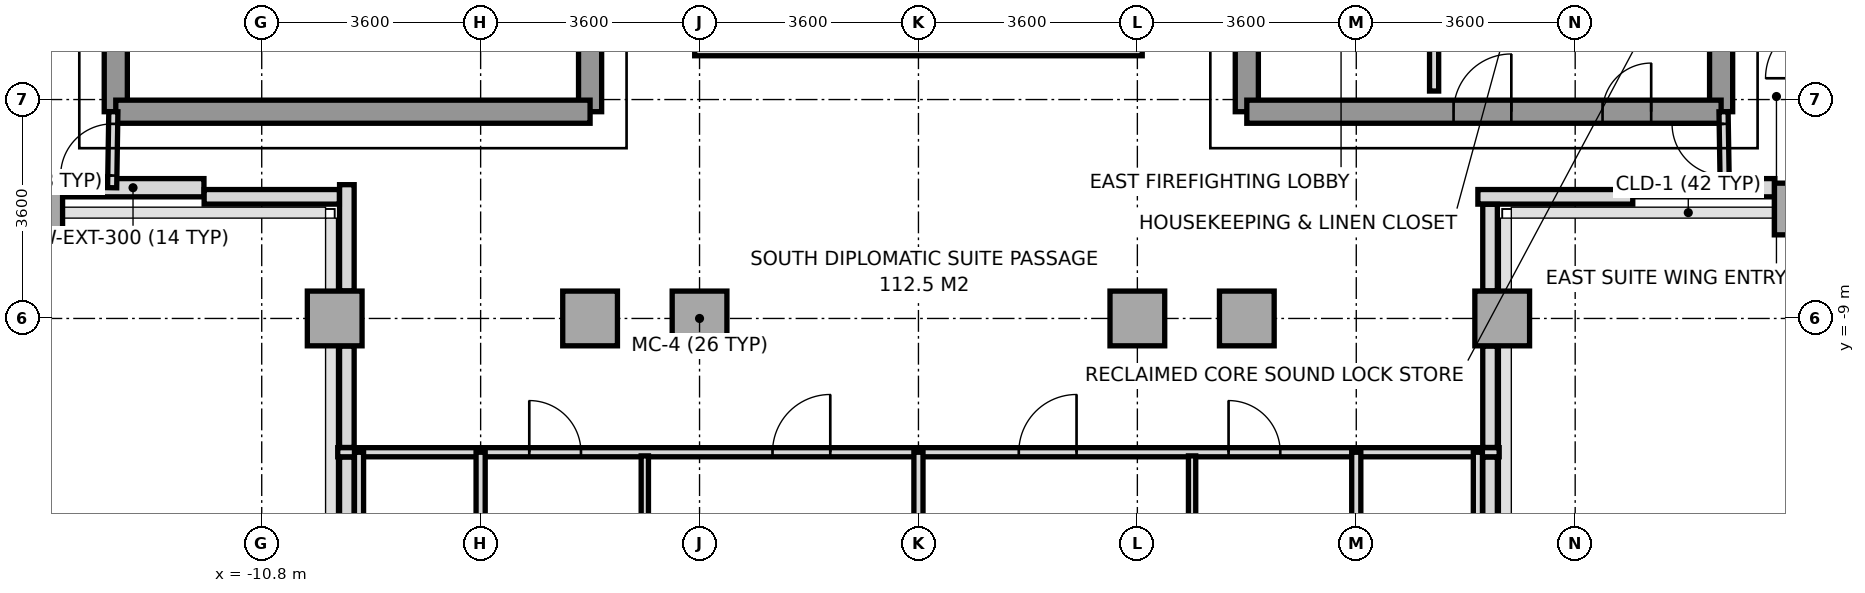
"""IFC4 building model, lengths in metres.
Left out: names, types, materials, properties, quantities, classifications, styles, units other than length and angle.
Written with IfcOpenShell. Run it as: python <this file> out.ifc"""

import sys

from ifc_helpers import new_model, si_unit, direction, frame, frame_2d, origin, origin_2d, place, context, subcontext, project, spatial, rectangle, extrude, source, transform, mapped, element, fill, save


model = new_model("IFC4")
c1 = context("Model", 3, precision=1e-05, world=origin(), true_north=direction((0.0, 1.0)))
c2 = subcontext(c1, "Body", "Model", "MODEL_VIEW")
j1 = project(units=[si_unit("LENGTHUNIT", "METRE"), si_unit("PLANEANGLEUNIT", "RADIAN")], contexts=[c1])
p1 = place(None, origin())
s1 = spatial("IfcSite", under=j1, at=p1, CompositionType="ELEMENT")
p2 = place(p1, origin())
s2 = spatial("IfcBuilding", under=s1, at=p2, CompositionType="ELEMENT")
p3 = place(p2, frame((0.0, 0.0, 201.2)))
s3 = spatial("IfcBuildingStorey", under=s2, at=p3, CompositionType="ELEMENT", Elevation=201.2)
m1 = source(origin(), c2, "Body", "SweptSolid", [
    extrude(rectangle(XDim=0.65, YDim=0.85, at=origin_2d()), origin(), (0.0, 0.0, 1.0), 3.2),
])
p4 = place(p3, frame((-14.4, -7.2, 0.0), z_axis=(0.0, 0.0, 1.0), x_axis=(1.0, 0.0, 0.0)))
e1 = element("IfcColumn", 1, at=p4, inside=s3, PredefinedType="COLUMN", context=c2, shape_type="MappedRepresentation", body=[
    mapped(m1, transform((0.0, 0.0, 0.0), x_axis=(1.0, 0.0, 0.0), y_axis=(0.0, 1.0, 0.0), z_axis=(0.0, 0.0, 1.0), scale=1.0)),
])
m2 = source(origin(), c2, "Body", "SweptSolid", [
    extrude(rectangle(XDim=0.9, YDim=0.9, at=origin_2d()), origin(), (0.0, 0.0, 1.0), 3.2),
])
for number, where, z_axis, x_axis in (
    (2, (-9.6, -9.0, 0.0), (0.0, 0.0, 1.0), (1.0, 0.0, 0.0)),
    (3, (-5.4, -9.0, 0.0), (0.0, 0.0, 1.0), (1.0, 0.0, 0.0)),
    (4, (-3.6, -9.0, 0.0), (0.0, 0.0, 1.0), (1.0, 0.0, 0.0)),
    (5, (3.6, -9.0, 0.0), (0.0, 0.0, 1.0), (1.0, 0.0, 0.0)),
    (6, (5.4, -9.0, 0.0), (0.0, 0.0, 1.0), (1.0, 0.0, 0.0)),
    (7, (9.6, -9.0, 0.0), (0.0, 0.0, 1.0), (1.0, 0.0, 0.0)),
):
    element("IfcColumn", number, at=place(p3, frame(where, z_axis=z_axis, x_axis=x_axis)), inside=s3, PredefinedType="COLUMN", context=c2, shape_type="MappedRepresentation", body=[
        mapped(m2, transform((0.0, 0.0, 0.0), x_axis=(1.0, 0.0, 0.0), y_axis=(0.0, 1.0, 0.0), z_axis=(0.0, 0.0, 1.0), scale=1.0)),
    ])
p5 = place(p3, frame((14.4, -7.2, 0.0), z_axis=(0.0, 0.0, 1.0), x_axis=(1.0, 0.0, 0.0)))
e8 = element("IfcColumn", 8, at=p5, inside=s3, PredefinedType="COLUMN", context=c2, shape_type="MappedRepresentation", body=[
    mapped(m1, transform((0.0, 0.0, 0.0), x_axis=(1.0, 0.0, 0.0), y_axis=(0.0, 1.0, 0.0), z_axis=(0.0, 0.0, 1.0), scale=1.0)),
])
for number, where, z_axis, x_axis in (
    (9, (-14.083, -6.85, 0.0), (0.0, 0.0, 1.0), (1.0, 0.0, 0.0)),
    (10, (11.75, -6.85, 0.0), (0.0, 0.0, 1.0), (1.0, 0.0, 0.0)),
):
    element("IfcWall", number, at=place(p3, frame(where, z_axis=z_axis, x_axis=x_axis)), inside=s3, PredefinedType="SOLIDWALL", context=c2, shape_type="SweptSolid", body=[
        extrude(rectangle(XDim=2.333, YDim=0.3, at=frame_2d((1.167, 0.0))), origin(), (0.0, 0.0, 1.0), 3.2),
    ])
p6 = place(p3, frame((11.747, -7.0, 0.0), z_axis=(0.0, 0.0, 1.0), x_axis=(-1.0, 0.0, 0.0)))
e11 = element("IfcWall", 11, at=p6, inside=s3, PredefinedType="PARAPET", context=c2, shape_type="SweptSolid", body=[
    extrude(rectangle(XDim=2.547, YDim=0.24, at=frame_2d((1.273, 0.0))), origin(), (0.0, 0.0, 1.0), 1.15),
])
p7 = place(p3, frame((9.4, -7.123, 0.0), z_axis=(0.0, 0.0, 1.0), x_axis=(0.0, -1.0, 0.0)))
e12 = element("IfcWall", 12, at=p7, inside=s3, PredefinedType="PARAPET", context=c2, shape_type="SweptSolid", body=[
    extrude(rectangle(XDim=1.424, YDim=0.24, at=frame_2d((0.712, 0.0))), origin(), (0.0, 0.0, 1.0), 1.15),
])
p8 = place(p3, frame((9.4, -9.453, 0.0), z_axis=(0.0, 0.0, 1.0), x_axis=(0.0, -1.0, 0.0)))
e13 = element("IfcWall", 13, at=p8, inside=s3, PredefinedType="PARAPET", context=c2, shape_type="SweptSolid", body=[
    extrude(rectangle(XDim=1.669, YDim=0.24, at=frame_2d((0.834, 0.0))), origin(), (0.0, 0.0, 1.0), 1.15),
])
p9 = place(p3, frame((9.4, -11.278, 0.0), z_axis=(0.0, 0.0, 1.0), x_axis=(0.0, -1.0, 0.0)))
e14 = element("IfcWall", 14, at=p9, inside=s3, PredefinedType="PARAPET", context=c2, shape_type="SweptSolid", body=[
    extrude(rectangle(XDim=4.325, YDim=0.24, at=frame_2d((2.162, 0.0))), origin(), (0.0, 0.0, 1.0), 1.15),
])
p10 = place(p3, frame((-9.4, -15.358, 0.0), z_axis=(0.0, 0.0, 1.0), x_axis=(0.0, 1.0, 0.0)))
e15 = element("IfcWall", 15, at=p10, inside=s3, PredefinedType="PARAPET", context=c2, shape_type="SweptSolid", body=[
    extrude(rectangle(XDim=4.08, YDim=0.24, at=frame_2d((2.04, 0.0))), origin(), (0.0, 0.0, 1.0), 1.15),
])
p11 = place(p3, frame((-9.4, -11.122, 0.0), z_axis=(0.0, 0.0, 1.0), x_axis=(0.0, 1.0, 0.0)))
e16 = element("IfcWall", 16, at=p11, inside=s3, PredefinedType="PARAPET", context=c2, shape_type="SweptSolid", body=[
    extrude(rectangle(XDim=1.669, YDim=0.24, at=frame_2d((0.834, 0.0))), origin(), (0.0, 0.0, 1.0), 1.15),
])
p12 = place(p3, frame((-9.4, -8.547, 0.0), z_axis=(0.0, 0.0, 1.0), x_axis=(0.0, 1.0, 0.0)))
e17 = element("IfcWall", 17, at=p12, inside=s3, PredefinedType="PARAPET", context=c2, shape_type="SweptSolid", body=[
    extrude(rectangle(XDim=1.747, YDim=0.24, at=frame_2d((0.874, 0.0))), origin(), (0.0, 0.0, 1.0), 1.15),
])
p13 = place(p3, frame((-9.523, -7.0, 0.0), z_axis=(0.0, 0.0, 1.0), x_axis=(-1.0, 0.0, 0.0)))
e18 = element("IfcWall", 18, at=p13, inside=s3, PredefinedType="PARAPET", context=c2, shape_type="SweptSolid", body=[
    extrude(rectangle(XDim=2.224, YDim=0.24, at=frame_2d((1.112, 0.0))), origin(), (0.0, 0.0, 1.0), 1.15),
])
p14 = place(p3, frame((-13.2, -5.6, 0.0), z_axis=(0.0, 0.0, 1.0), x_axis=(0.0, 1.0, 0.0)))
e19 = element("IfcWall", 19, at=p14, inside=s3, PredefinedType="SHEAR", context=c2, shape_type="SweptSolid", body=[
    extrude(rectangle(XDim=11.2, YDim=0.38, at=frame_2d((5.6, 0.0))), origin(), (0.0, 0.0, 1.0), 3.2),
])
p15 = place(p3, frame((-5.4, -5.6, 0.0), z_axis=(0.0, 0.0, 1.0), x_axis=(0.0, 1.0, 0.0)))
e20 = element("IfcWall", 20, at=p15, inside=s3, PredefinedType="SHEAR", context=c2, shape_type="SweptSolid", body=[
    extrude(rectangle(XDim=12.5, YDim=0.38, at=frame_2d((6.25, 0.0))), origin(), (0.0, 0.0, 1.0), 3.2),
])
p16 = place(p15, frame((4.55, 0.0, 0.0)))
e21 = element("IfcOpeningElement", 21, at=p16, cuts=e20, PredefinedType="OPENING", context=c2, shape_type="SweptSolid", body=[
    extrude(rectangle(XDim=1.2, YDim=2.2, at=frame_2d((0.6, 1.1))), frame((0.0, 0.2, 0.0), z_axis=(0.0, -1.0, 0.0), x_axis=(1.0, 0.0, 0.0)), (0.0, 0.0, 1.0), 0.4),
])
p17 = place(p15, frame((10.45, 0.0, 0.0)))
e22 = element("IfcOpeningElement", 22, at=p17, cuts=e20, PredefinedType="OPENING", context=c2, shape_type="SweptSolid", body=[
    extrude(rectangle(XDim=1.2, YDim=2.2, at=frame_2d((0.6, 1.1))), frame((0.0, 0.2, 0.0), z_axis=(0.0, -1.0, 0.0), x_axis=(1.0, 0.0, 0.0)), (0.0, 0.0, 1.0), 0.4),
])
p18 = place(p3, frame((-13.2, -5.6, 0.0), z_axis=(0.0, 0.0, 1.0), x_axis=(1.0, 0.0, 0.0)))
e23 = element("IfcWall", 23, at=p18, inside=s3, PredefinedType="SHEAR", context=c2, shape_type="SweptSolid", body=[
    extrude(rectangle(XDim=7.8, YDim=0.38, at=frame_2d((3.9, 0.0))), origin(), (0.0, 0.0, 1.0), 3.2),
])
p19 = place(p3, frame((13.2, -5.6, 0.0), z_axis=(0.0, 0.0, 1.0), x_axis=(0.0, 1.0, 0.0)))
e24 = element("IfcWall", 24, at=p19, inside=s3, PredefinedType="SHEAR", context=c2, shape_type="SweptSolid", body=[
    extrude(rectangle(XDim=11.2, YDim=0.38, at=frame_2d((5.6, 0.0))), origin(), (0.0, 0.0, 1.0), 3.2),
])
p20 = place(p3, frame((5.4, -5.6, 0.0), z_axis=(0.0, 0.0, 1.0), x_axis=(0.0, 1.0, 0.0)))
e25 = element("IfcWall", 25, at=p20, inside=s3, PredefinedType="SHEAR", context=c2, shape_type="SweptSolid", body=[
    extrude(rectangle(XDim=12.5, YDim=0.38, at=frame_2d((6.25, 0.0))), origin(), (0.0, 0.0, 1.0), 3.2),
])
p21 = place(p20, frame((4.55, 0.0, 0.0)))
e26 = element("IfcOpeningElement", 26, at=p21, cuts=e25, PredefinedType="OPENING", context=c2, shape_type="SweptSolid", body=[
    extrude(rectangle(XDim=1.2, YDim=2.2, at=frame_2d((0.6, 1.1))), frame((0.0, 0.2, 0.0), z_axis=(0.0, -1.0, 0.0), x_axis=(1.0, 0.0, 0.0)), (0.0, 0.0, 1.0), 0.4),
])
p22 = place(p20, frame((10.45, 0.0, 0.0)))
e27 = element("IfcOpeningElement", 27, at=p22, cuts=e25, PredefinedType="OPENING", context=c2, shape_type="SweptSolid", body=[
    extrude(rectangle(XDim=1.2, YDim=2.2, at=frame_2d((0.6, 1.1))), frame((0.0, 0.2, 0.0), z_axis=(0.0, -1.0, 0.0), x_axis=(1.0, 0.0, 0.0)), (0.0, 0.0, 1.0), 0.4),
])
p23 = place(p20, frame((7.88, 0.0, 0.0)))
e28 = element("IfcOpeningElement", 28, at=p23, cuts=e25, PredefinedType="OPENING", context=c2, shape_type="SweptSolid", body=[
    extrude(rectangle(XDim=0.8, YDim=2.1, at=frame_2d((0.4, 1.05))), frame((0.0, 0.2, 0.0), z_axis=(0.0, -1.0, 0.0), x_axis=(1.0, 0.0, 0.0)), (0.0, 0.0, 1.0), 0.4),
])
p24 = place(p3, frame((5.4, -5.6, 0.0), z_axis=(0.0, 0.0, 1.0), x_axis=(1.0, 0.0, 0.0)))
e29 = element("IfcWall", 29, at=p24, inside=s3, PredefinedType="SHEAR", context=c2, shape_type="SweptSolid", body=[
    extrude(rectangle(XDim=7.8, YDim=0.38, at=frame_2d((3.9, 0.0))), origin(), (0.0, 0.0, 1.0), 3.2),
])
p25 = place(p24, frame((5.85, 0.0, 0.0)))
e30 = element("IfcOpeningElement", 30, at=p25, cuts=e29, PredefinedType="OPENING", context=c2, shape_type="SweptSolid", body=[
    extrude(rectangle(XDim=0.8, YDim=2.1, at=frame_2d((0.4, 1.05))), frame((0.0, 0.2, 0.0), z_axis=(0.0, -1.0, 0.0), x_axis=(1.0, 0.0, 0.0)), (0.0, 0.0, 1.0), 0.4),
])
p26 = place(p24, frame((3.4, 0.0, 0.0)))
e31 = element("IfcOpeningElement", 31, at=p26, cuts=e29, PredefinedType="OPENING", context=c2, shape_type="SweptSolid", body=[
    extrude(rectangle(XDim=0.95, YDim=2.15, at=frame_2d((0.475, 1.075))), frame((0.0, 0.2, 0.0), z_axis=(0.0, -1.0, 0.0), x_axis=(1.0, 0.0, 0.0)), (0.0, 0.0, 1.0), 0.4),
])
p27 = place(p3, frame((8.48, -5.26, 0.0), z_axis=(0.0, 0.0, 1.0), x_axis=(0.0, 1.0, 0.0)))
e32 = element("IfcWall", 32, at=p27, inside=s3, PredefinedType="PARTITIONING", context=c2, shape_type="SweptSolid", body=[
    extrude(rectangle(XDim=2.94, YDim=0.15, at=frame_2d((1.47, 0.0))), origin(), (0.0, 0.0, 1.0), 3.2),
])
p28 = place(p3, frame((-9.55, -11.2, 0.0), z_axis=(0.0, 0.0, 1.0), x_axis=(1.0, 0.0, 0.0)))
e33 = element("IfcWall", 33, at=p28, inside=s3, PredefinedType="PARTITIONING", context=c2, shape_type="SweptSolid", body=[
    extrude(rectangle(XDim=19.1, YDim=0.15, at=frame_2d((9.55, 0.0))), origin(), (0.0, 0.0, 1.0), 3.2),
])
p29 = place(p28, frame((3.15, 0.0, 0.0)))
e34 = element("IfcOpeningElement", 34, at=p29, cuts=e33, PredefinedType="OPENING", context=c2, shape_type="SweptSolid", body=[
    extrude(rectangle(XDim=0.85, YDim=2.1, at=frame_2d((0.425, 1.05))), frame((0.0, 0.085, 0.0), z_axis=(0.0, -1.0, 0.0), x_axis=(1.0, 0.0, 0.0)), (0.0, 0.0, 1.0), 0.17),
])
p30 = place(p28, frame((7.15, 0.0, 0.0)))
e35 = element("IfcOpeningElement", 35, at=p30, cuts=e33, PredefinedType="OPENING", context=c2, shape_type="SweptSolid", body=[
    extrude(rectangle(XDim=0.95, YDim=2.15, at=frame_2d((0.475, 1.075))), frame((0.0, 0.085, 0.0), z_axis=(0.0, -1.0, 0.0), x_axis=(1.0, 0.0, 0.0)), (0.0, 0.0, 1.0), 0.17),
])
p31 = place(p28, frame((14.65, 0.0, 0.0)))
e36 = element("IfcOpeningElement", 36, at=p31, cuts=e33, PredefinedType="OPENING", context=c2, shape_type="SweptSolid", body=[
    extrude(rectangle(XDim=0.85, YDim=2.1, at=frame_2d((0.425, 1.05))), frame((0.0, 0.085, 0.0), z_axis=(0.0, -1.0, 0.0), x_axis=(1.0, 0.0, 0.0)), (0.0, 0.0, 1.0), 0.17),
])
p32 = place(p28, frame((11.2, 0.0, 0.0)))
e37 = element("IfcOpeningElement", 37, at=p32, cuts=e33, PredefinedType="OPENING", context=c2, shape_type="SweptSolid", body=[
    extrude(rectangle(XDim=0.95, YDim=2.15, at=frame_2d((0.475, 1.075))), frame((0.0, 0.085, 0.0), z_axis=(0.0, -1.0, 0.0), x_axis=(1.0, 0.0, 0.0)), (0.0, 0.0, 1.0), 0.17),
])
for number, where, z_axis, x_axis in (
    (38, (-9.2, -15.68, 0.0), (0.0, 0.0, 1.0), (0.0, 1.0, 0.0)),
    (39, (9.2, -15.68, 0.0), (0.0, 0.0, 1.0), (0.0, 1.0, 0.0)),
):
    element("IfcWall", number, at=place(p3, frame(where, z_axis=z_axis, x_axis=x_axis)), inside=s3, PredefinedType="PARTITIONING", context=c2, shape_type="SweptSolid", body=[
        extrude(rectangle(XDim=4.48, YDim=0.15, at=frame_2d((2.24, 0.0))), origin(), (0.0, 0.0, 1.0), 3.2),
    ])
p33 = place(p3, frame((-7.2, -23.4, 0.0), z_axis=(0.0, 0.0, 1.0), x_axis=(0.0, 1.0, 0.0)))
e40 = element("IfcWall", 40, at=p33, inside=s3, PredefinedType="PARTITIONING", context=c2, shape_type="SweptSolid", body=[
    extrude(rectangle(XDim=12.2, YDim=0.15, at=frame_2d((6.1, 0.0))), origin(), (0.0, 0.0, 1.0), 2.75),
])
p34 = place(p3, frame((0.0, -24.65, 0.0), z_axis=(0.0, 0.0, 1.0), x_axis=(0.0, 1.0, 0.0)))
e41 = element("IfcWall", 41, at=p34, inside=s3, PredefinedType="PARTITIONING", context=c2, shape_type="SweptSolid", body=[
    extrude(rectangle(XDim=13.45, YDim=0.15, at=frame_2d((6.725, 0.0))), origin(), (0.0, 0.0, 1.0), 2.75),
])
p35 = place(p3, frame((7.2, -23.4, 0.0), z_axis=(0.0, 0.0, 1.0), x_axis=(0.0, 1.0, 0.0)))
e42 = element("IfcWall", 42, at=p35, inside=s3, PredefinedType="PARTITIONING", context=c2, shape_type="SweptSolid", body=[
    extrude(rectangle(XDim=12.2, YDim=0.15, at=frame_2d((6.1, 0.0))), origin(), (0.0, 0.0, 1.0), 2.75),
])
for number, where, z_axis, x_axis in (
    (43, (-4.5, -14.36, 0.0), (0.0, 0.0, 1.0), (0.0, 1.0, 0.0)),
    (44, (4.5, -14.36, 0.0), (0.0, 0.0, 1.0), (0.0, 1.0, 0.0)),
):
    element("IfcWall", number, at=place(p3, frame(where, z_axis=z_axis, x_axis=x_axis)), inside=s3, PredefinedType="PARTITIONING", context=c2, shape_type="SweptSolid", body=[
        extrude(rectangle(XDim=3.1, YDim=0.12, at=frame_2d((1.55, 0.0))), origin(), (0.0, 0.0, 1.0), 2.75),
    ])
p36 = place(p3, frame((-13.26, -6.85, 0.0), z_axis=(0.0, 0.0, 1.0), x_axis=(0.016013571389, 0.999871774545, 0.0)))
e45 = element("IfcWall", 45, at=p36, inside=s3, PredefinedType="PARTITIONING", context=c2, shape_type="SweptSolid", body=[
    extrude(rectangle(XDim=1.25, YDim=0.15, at=frame_2d((0.625, 0.0))), origin(), (0.0, 0.0, 1.0), 3.2),
])
p37 = place(p36, frame((0.2, 0.0, 0.0)))
e46 = element("IfcOpeningElement", 46, at=p37, cuts=e45, PredefinedType="OPENING", context=c2, shape_type="SweptSolid", body=[
    extrude(rectangle(XDim=0.85, YDim=2.1, at=frame_2d((0.425, 1.05))), frame((0.0, 0.085, 0.0), z_axis=(0.0, -1.0, 0.0), x_axis=(1.0, 0.0, 0.0)), (0.0, 0.0, 1.0), 0.17),
])
p38 = place(p3, frame((13.26, -6.85, 0.0), z_axis=(0.0, 0.0, 1.0), x_axis=(-0.016013571389, 0.999871774545, 0.0)))
e47 = element("IfcWall", 47, at=p38, inside=s3, PredefinedType="PARTITIONING", context=c2, shape_type="SweptSolid", body=[
    extrude(rectangle(XDim=1.25, YDim=0.15, at=frame_2d((0.625, 0.0))), origin(), (0.0, 0.0, 1.0), 3.2),
])
p39 = place(p38, frame((0.2, 0.0, 0.0)))
e48 = element("IfcOpeningElement", 48, at=p39, cuts=e47, PredefinedType="OPENING", context=c2, shape_type="SweptSolid", body=[
    extrude(rectangle(XDim=0.85, YDim=2.1, at=frame_2d((0.425, 1.05))), frame((0.0, 0.085, 0.0), z_axis=(0.0, -1.0, 0.0), x_axis=(1.0, 0.0, 0.0)), (0.0, 0.0, 1.0), 0.17),
])
p40 = place(p3, frame((-3.68, -4.56, 0.0), z_axis=(0.0, 0.0, 1.0), x_axis=(1.0, 0.0, 0.0)))
e49 = element("IfcWall", 49, at=p40, inside=s3, PredefinedType="PARAPET", context=c2, shape_type="SweptSolid", body=[
    extrude(rectangle(XDim=7.36, YDim=0.24, at=frame_2d((3.68, 0.0))), origin(), (0.0, 0.0, 1.0), 1.15),
])
m3 = source(origin(), c2, "Body", "SweptSolid", [
    extrude(rectangle(XDim=0.8, YDim=2.1, at=frame_2d((0.4, 1.05))), frame((0.0, 0.025, 0.0), z_axis=(0.0, -1.0, 0.0), x_axis=(1.0, 0.0, 0.0)), (0.0, 0.0, 1.0), 0.05),
])
p41 = place(p25, origin())
e50 = element("IfcDoor", 50, at=p41, inside=s3, OperationType="SINGLE_SWING_RIGHT", PredefinedType="DOOR", context=c2, shape_type="MappedRepresentation", body=[
    mapped(m3, transform((0.0, 0.0, 0.0), x_axis=(1.0, 0.0, 0.0), y_axis=(0.0, 1.0, 0.0), z_axis=(0.0, 0.0, 1.0), scale=1.0)),
])
fill(e30, e50)
m4 = source(origin(), c2, "Body", "SweptSolid", [
    extrude(rectangle(XDim=0.95, YDim=2.15, at=frame_2d((0.475, 1.075))), frame((0.0, 0.025, 0.0), z_axis=(0.0, -1.0, 0.0), x_axis=(1.0, 0.0, 0.0)), (0.0, 0.0, 1.0), 0.05),
])
p42 = place(p26, origin())
e51 = element("IfcDoor", 51, at=p42, inside=s3, OperationType="SINGLE_SWING_RIGHT", PredefinedType="DOOR", context=c2, shape_type="MappedRepresentation", body=[
    mapped(m4, transform((0.0, 0.0, 0.0), x_axis=(1.0, 0.0, 0.0), y_axis=(0.0, 1.0, 0.0), z_axis=(0.0, 0.0, 1.0), scale=1.0)),
])
fill(e31, e51)
m5 = source(origin(), c2, "Body", "SweptSolid", [
    extrude(rectangle(XDim=0.85, YDim=2.1, at=frame_2d((0.425, 1.05))), frame((0.0, 0.025, 0.0), z_axis=(0.0, -1.0, 0.0), x_axis=(1.0, 0.0, 0.0)), (0.0, 0.0, 1.0), 0.05),
])
p43 = place(p29, origin())
e52 = element("IfcDoor", 52, at=p43, inside=s3, OperationType="SINGLE_SWING_LEFT", PredefinedType="DOOR", context=c2, shape_type="MappedRepresentation", body=[
    mapped(m5, transform((0.0, 0.0, 0.0), x_axis=(1.0, 0.0, 0.0), y_axis=(0.0, 1.0, 0.0), z_axis=(0.0, 0.0, 1.0), scale=1.0)),
])
fill(e34, e52)
p44 = place(p30, origin())
e53 = element("IfcDoor", 53, at=p44, inside=s3, OperationType="SINGLE_SWING_RIGHT", PredefinedType="DOOR", context=c2, shape_type="MappedRepresentation", body=[
    mapped(m4, transform((0.0, 0.0, 0.0), x_axis=(1.0, 0.0, 0.0), y_axis=(0.0, 1.0, 0.0), z_axis=(0.0, 0.0, 1.0), scale=1.0)),
])
fill(e35, e53)
p45 = place(p31, origin())
e54 = element("IfcDoor", 54, at=p45, inside=s3, OperationType="SINGLE_SWING_LEFT", PredefinedType="DOOR", context=c2, shape_type="MappedRepresentation", body=[
    mapped(m5, transform((0.0, 0.0, 0.0), x_axis=(1.0, 0.0, 0.0), y_axis=(0.0, 1.0, 0.0), z_axis=(0.0, 0.0, 1.0), scale=1.0)),
])
fill(e36, e54)
p46 = place(p32, origin())
e55 = element("IfcDoor", 55, at=p46, inside=s3, OperationType="SINGLE_SWING_RIGHT", PredefinedType="DOOR", context=c2, shape_type="MappedRepresentation", body=[
    mapped(m4, transform((0.0, 0.0, 0.0), x_axis=(1.0, 0.0, 0.0), y_axis=(0.0, 1.0, 0.0), z_axis=(0.0, 0.0, 1.0), scale=1.0)),
])
fill(e37, e55)
p47 = place(p37, origin())
e56 = element("IfcDoor", 56, at=p47, inside=s3, OperationType="SINGLE_SWING_LEFT", PredefinedType="DOOR", context=c2, shape_type="MappedRepresentation", body=[
    mapped(m5, transform((0.0, 0.0, 0.0), x_axis=(1.0, 0.0, 0.0), y_axis=(0.0, 1.0, 0.0), z_axis=(0.0, 0.0, 1.0), scale=1.0)),
])
fill(e46, e56)
p48 = place(p39, origin())
e57 = element("IfcDoor", 57, at=p48, inside=s3, OperationType="SINGLE_SWING_RIGHT", PredefinedType="DOOR", context=c2, shape_type="MappedRepresentation", body=[
    mapped(m5, transform((0.0, 0.0, 0.0), x_axis=(1.0, 0.0, 0.0), y_axis=(0.0, 1.0, 0.0), z_axis=(0.0, 0.0, 1.0), scale=1.0)),
])
fill(e48, e57)
save(model, sys.argv[1])
